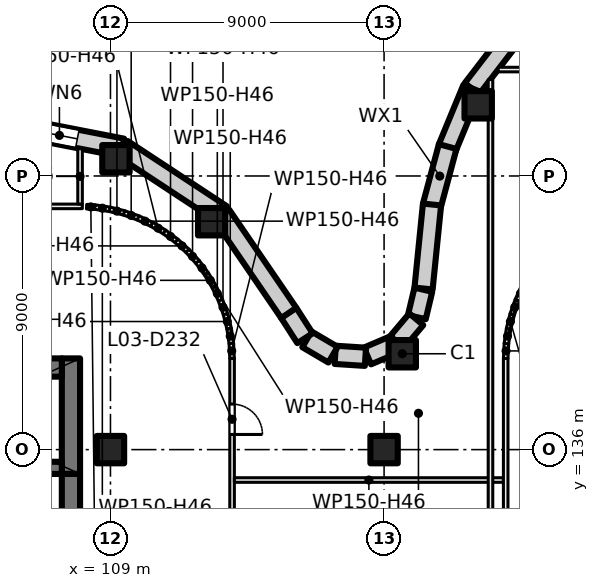
"""IFC4 building model, lengths in metres.
Left out: names, types, materials, properties, quantities, classifications, styles, units other than length and angle.
Written with IfcOpenShell. Run it as: python <this file> out.ifc"""

import sys

from ifc_helpers import new_model, si_unit, direction, frame, frame_2d, origin, origin_2d, place, context, subcontext, project, spatial, rectangle, extrude, element, fill, save


model = new_model("IFC4")
c1 = context("Model", 3, precision=1e-05, world=origin(), true_north=direction((0.0, 1.0)))
c2 = subcontext(c1, "Body", "Model", "MODEL_VIEW")
j1 = project(units=[si_unit("LENGTHUNIT", "METRE"), si_unit("PLANEANGLEUNIT", "RADIAN")], contexts=[c1])
p1 = place(None, origin())
s1 = spatial("IfcSite", under=j1, at=p1, CompositionType="ELEMENT")
p2 = place(p1, origin())
s2 = spatial("IfcBuilding", under=s1, at=p2, CompositionType="ELEMENT")
p3 = place(p2, frame((0.0, 0.0, 17.5)))
s3 = spatial("IfcBuildingStorey", under=s2, at=p3, CompositionType="ELEMENT", Elevation=17.5)
for number, where, z_axis, x_axis in (
    (1, (109.0, 136.0, 0.0), (0.0, 0.0, 1.0), (1.0, 0.0, 0.0)),
    (2, (118.0, 136.0, 0.0), (0.0, 0.0, 1.0), (1.0, 0.0, 0.0)),
    (3, (109.18, 145.567, 0.0), (0.0, 0.0, 1.0), (1.0, 0.0, 0.0)),
    (4, (112.329, 143.496, 0.0), (0.0, 0.0, 1.0), (1.0, 0.0, 0.0)),
    (5, (118.598, 139.153, 0.0), (0.0, 0.0, 1.0), (1.0, 0.0, 0.0)),
    (6, (121.095, 147.341, 0.0), (0.0, 0.0, 1.0), (1.0, 0.0, 0.0)),
):
    element("IfcColumn", number, at=place(p3, frame(where, z_axis=z_axis, x_axis=x_axis)), inside=s3, PredefinedType="COLUMN", context=c2, shape_type="SweptSolid", body=[
        extrude(rectangle(XDim=0.9, YDim=0.9, at=origin_2d()), origin(), (0.0, 0.0, 1.0), 5.0),
    ])
p4 = place(p3, frame((107.7, 139.0, 0.0), z_axis=(0.0, 0.0, 1.0), x_axis=(0.0, -1.0, 0.0)))
e7 = element("IfcWall", 7, at=p4, inside=s3, PredefinedType="SHEAR", context=c2, shape_type="SweptSolid", body=[
    extrude(rectangle(XDim=3.8, YDim=0.6, at=frame_2d((1.9, 0.0))), origin(), (0.0, 0.0, 1.0), 5.0),
])
p5 = place(p3, frame((107.7, 135.2, 0.0), z_axis=(0.0, 0.0, 1.0), x_axis=(0.0, -1.0, 0.0)))
e8 = element("IfcWall", 8, at=p5, inside=s3, PredefinedType="SHEAR", context=c2, shape_type="SweptSolid", body=[
    extrude(rectangle(XDim=14.4, YDim=0.6, at=frame_2d((7.2, 0.0))), origin(), (0.0, 0.0, 1.0), 5.0),
])
p6 = place(p3, frame((107.4, 138.7, 0.0), z_axis=(0.0, 0.0, 1.0), x_axis=(-1.0, 0.0, 0.0)))
e9 = element("IfcWall", 9, at=p6, inside=s3, PredefinedType="SHEAR", context=c2, shape_type="SweptSolid", body=[
    extrude(rectangle(XDim=7.8, YDim=0.6, at=frame_2d((3.9, 0.0))), origin(), (0.0, 0.0, 1.0), 5.0),
])
p7 = place(p3, frame((107.4, 135.4, 0.0), z_axis=(0.0, 0.0, 1.0), x_axis=(-1.0, 0.0, 0.0)))
e10 = element("IfcWall", 10, at=p7, inside=s3, PredefinedType="SHEAR", context=c2, shape_type="SweptSolid", body=[
    extrude(rectangle(XDim=7.8, YDim=0.4, at=frame_2d((3.9, 0.0))), origin(), (0.0, 0.0, 1.0), 5.0),
])
p8 = place(p3, frame((120.891, 147.872, 0.0), z_axis=(0.0, 0.0, 1.0), x_axis=(0.609058260448, 0.793125485267, 0.0)))
e11 = element("IfcWall", 11, at=p8, inside=s3, PredefinedType="SOLIDWALL", context=c2, shape_type="SweptSolid", body=[
    extrude(rectangle(XDim=2.044, YDim=0.6, at=frame_2d((1.022, 0.0))), origin(), (0.0, 0.0, 1.0), 4.6),
])
p9 = place(p3, frame((120.079, 145.931, 0.0), z_axis=(0.0, 0.0, 1.0), x_axis=(0.382375593358, 0.924006983526, 0.0)))
e12 = element("IfcWall", 12, at=p9, inside=s3, PredefinedType="SOLIDWALL", context=c2, shape_type="SweptSolid", body=[
    extrude(rectangle(XDim=2.114, YDim=0.6, at=frame_2d((1.057, 0.0))), origin(), (0.0, 0.0, 1.0), 4.6),
])
p10 = place(p3, frame((119.571, 144.024, 0.0), z_axis=(0.0, 0.0, 1.0), x_axis=(0.25888565912, 0.965907974655, 0.0)))
e13 = element("IfcWall", 13, at=p10, inside=s3, PredefinedType="SOLIDWALL", context=c2, shape_type="SweptSolid", body=[
    extrude(rectangle(XDim=2.012, YDim=0.6, at=frame_2d((1.006, 0.0))), origin(), (0.0, 0.0, 1.0), 4.6),
])
p11 = place(p3, frame((119.299, 141.298, 0.0), z_axis=(0.0, 0.0, 1.0), x_axis=(0.100121632527, 0.994975205068, 0.0)))
e14 = element("IfcWall", 14, at=p11, inside=s3, PredefinedType="SOLIDWALL", context=c2, shape_type="SweptSolid", body=[
    extrude(rectangle(XDim=2.777, YDim=0.6, at=frame_2d((1.389, 0.0))), origin(), (0.0, 0.0, 1.0), 4.6),
])
p12 = place(p3, frame((119.077, 140.358, 0.0), z_axis=(0.0, 0.0, 1.0), x_axis=(0.231477954295, 0.972840149601, 0.0)))
e15 = element("IfcWall", 15, at=p12, inside=s3, PredefinedType="SOLIDWALL", context=c2, shape_type="SweptSolid", body=[
    extrude(rectangle(XDim=0.926, YDim=0.6, at=frame_2d((0.463, 0.0))), origin(), (0.0, 0.0, 1.0), 4.6),
])
for number, where, z_axis, x_axis in (
    (16, (118.417, 139.526, 0.0), (0.0, 0.0, 1.0), (0.645, 0.764, 0.0)),
    (17, (117.454, 139.081, 0.0), (0.0, 0.0, 1.0), (0.92, 0.392, 0.0)),
    (18, (116.393, 139.117, 0.0), (0.0, 0.0, 1.0), (0.998, -0.064, 0.0)),
    (19, (115.461, 139.627, 0.0), (0.0, 0.0, 1.0), (0.862, -0.507, 0.0)),
):
    element("IfcWall", number, at=place(p3, frame(where, z_axis=z_axis, x_axis=x_axis)), inside=s3, PredefinedType="SOLIDWALL", context=c2, shape_type="SweptSolid", body=[
        extrude(rectangle(XDim=0.996, YDim=0.6, at=frame_2d((0.498, 0.0))), origin(), (0.0, 0.0, 1.0), 4.6),
    ])
p13 = place(p3, frame((114.86, 140.502, 0.0), z_axis=(0.0, 0.0, 1.0), x_axis=(0.541339592117, -0.84080404733, 0.0)))
e20 = element("IfcWall", 20, at=p13, inside=s3, PredefinedType="SOLIDWALL", context=c2, shape_type="SweptSolid", body=[
    extrude(rectangle(XDim=0.996, YDim=0.6, at=frame_2d((0.498, 0.0))), origin(), (0.0, 0.0, 1.0), 4.6),
])
p14 = place(p3, frame((112.661, 143.72, 0.0), z_axis=(0.0, 0.0, 1.0), x_axis=(0.564314082571, -0.825560183277, 0.0)))
e21 = element("IfcWall", 21, at=p14, inside=s3, PredefinedType="SOLIDWALL", context=c2, shape_type="SweptSolid", body=[
    extrude(rectangle(XDim=3.905, YDim=0.6, at=frame_2d((1.953, 0.0))), origin(), (0.0, 0.0, 1.0), 4.6),
])
p15 = place(p3, frame((109.401, 145.9, 0.0), z_axis=(0.0, 0.0, 1.0), x_axis=(0.835543958523, -0.549423601037, 0.0)))
e22 = element("IfcWall", 22, at=p15, inside=s3, PredefinedType="SOLIDWALL", context=c2, shape_type="SweptSolid", body=[
    extrude(rectangle(XDim=3.906, YDim=0.6, at=frame_2d((1.953, 0.0))), origin(), (0.0, 0.0, 1.0), 4.6),
])
p16 = place(p3, frame((105.44, 146.702, 0.0), z_axis=(0.0, 0.0, 1.0), x_axis=(0.981593603981, -0.190981665674, 0.0)))
e23 = element("IfcWall", 23, at=p16, inside=s3, PredefinedType="SOLIDWALL", context=c2, shape_type="SweptSolid", body=[
    extrude(rectangle(XDim=4.025, YDim=0.6, at=frame_2d((2.013, 0.0))), origin(), (0.0, 0.0, 1.0), 4.6),
])
p17 = place(p16, frame((1.316, 0.0, 0.9)))
e24 = element("IfcOpeningElement", 24, at=p17, cuts=e23, PredefinedType="OPENING", context=c2, shape_type="SweptSolid", body=[
    extrude(rectangle(XDim=1.2, YDim=3.0, at=frame_2d((0.6, 1.5))), frame((0.0, 0.31, 0.0), z_axis=(0.0, -1.0, 0.0), x_axis=(1.0, 0.0, 0.0)), (0.0, 0.0, 1.0), 0.62),
])
p18 = place(p3, frame((90.998, 144.0, 0.0), z_axis=(0.0, 0.0, 1.0), x_axis=(1.0, 0.0, 0.0)))
e25 = element("IfcWall", 25, at=p18, inside=s3, PredefinedType="PARTITIONING", context=c2, shape_type="SweptSolid", body=[
    extrude(rectangle(XDim=17.077, YDim=0.15, at=frame_2d((8.539, 0.0))), origin(), (0.0, 0.0, 1.0), 4.6),
])
p19 = place(p18, frame((1.254, 0.0, 0.0)))
e26 = element("IfcOpeningElement", 26, at=p19, cuts=e25, PredefinedType="OPENING", context=c2, shape_type="SweptSolid", body=[
    extrude(rectangle(XDim=1.0, YDim=2.1, at=frame_2d((0.5, 1.05))), frame((0.0, 0.085, 0.0), z_axis=(0.0, -1.0, 0.0), x_axis=(1.0, 0.0, 0.0)), (0.0, 0.0, 1.0), 0.17),
])
p20 = place(p18, frame((9.75, 0.0, 0.0)))
e27 = element("IfcOpeningElement", 27, at=p20, cuts=e25, PredefinedType="OPENING", context=c2, shape_type="SweptSolid", body=[
    extrude(rectangle(XDim=1.0, YDim=2.1, at=frame_2d((0.5, 1.05))), frame((0.0, 0.085, 0.0), z_axis=(0.0, -1.0, 0.0), x_axis=(1.0, 0.0, 0.0)), (0.0, 0.0, 1.0), 0.17),
])
p21 = place(p3, frame((108.0, 144.075, 0.0), z_axis=(0.0, 0.0, 1.0), x_axis=(0.0, 1.0, 0.0)))
e28 = element("IfcWall", 28, at=p21, inside=s3, PredefinedType="PARTITIONING", context=c2, shape_type="SweptSolid", body=[
    extrude(rectangle(XDim=1.823, YDim=0.15, at=frame_2d((0.912, 0.0))), origin(), (0.0, 0.0, 1.0), 4.6),
])
p22 = place(p3, frame((108.214, 143.99, 0.0), z_axis=(0.0, 0.0, 1.0), x_axis=(0.99876534507, -0.049676810357, 0.0)))
e29 = element("IfcWall", 29, at=p22, inside=s3, PredefinedType="PARTITIONING", context=c2, shape_type="SweptSolid", body=[
    extrude(rectangle(XDim=0.28, YDim=0.15, at=frame_2d((0.14, 0.0))), origin(), (0.0, 0.0, 1.0), 4.6),
])
p23 = place(p3, frame((108.486, 143.977, 0.0), z_axis=(0.0, 0.0, 1.0), x_axis=(0.988925572052, -0.148412307247, 0.0)))
e30 = element("IfcWall", 30, at=p23, inside=s3, PredefinedType="PARTITIONING", context=c2, shape_type="SweptSolid", body=[
    extrude(rectangle(XDim=0.499, YDim=0.15, at=frame_2d((0.249, 0.0))), origin(), (0.0, 0.0, 1.0), 4.6),
])
p24 = place(p3, frame((108.971, 143.905, 0.0), z_axis=(0.0, 0.0, 1.0), x_axis=(0.970113715952, -0.242650732785, 0.0)))
e31 = element("IfcWall", 31, at=p24, inside=s3, PredefinedType="PARTITIONING", context=c2, shape_type="SweptSolid", body=[
    extrude(rectangle(XDim=0.499, YDim=0.15, at=frame_2d((0.25, 0.0))), origin(), (0.0, 0.0, 1.0), 4.6),
])
for number, where, z_axis, x_axis in (
    (32, (109.447, 143.786, 0.0), (0.0, 0.0, 1.0), (0.941, -0.337, 0.0)),
    (33, (109.91, 143.621, 0.0), (0.0, 0.0, 1.0), (0.904, -0.428, 0.0)),
):
    element("IfcWall", number, at=place(p3, frame(where, z_axis=z_axis, x_axis=x_axis)), inside=s3, PredefinedType="PARTITIONING", context=c2, shape_type="SweptSolid", body=[
        extrude(rectangle(XDim=0.498, YDim=0.15, at=frame_2d((0.249, 0.0))), origin(), (0.0, 0.0, 1.0), 4.6),
    ])
p25 = place(p3, frame((110.354, 143.412, 0.0), z_axis=(0.0, 0.0, 1.0), x_axis=(0.85671397893, -0.515791778052, 0.0)))
e34 = element("IfcWall", 34, at=p25, inside=s3, PredefinedType="PARTITIONING", context=c2, shape_type="SweptSolid", body=[
    extrude(rectangle(XDim=0.499, YDim=0.15, at=frame_2d((0.249, 0.0))), origin(), (0.0, 0.0, 1.0), 4.6),
])
p26 = place(p3, frame((110.775, 143.159, 0.0), z_axis=(0.0, 0.0, 1.0), x_axis=(0.80404358372, -0.594570362092, 0.0)))
e35 = element("IfcWall", 35, at=p26, inside=s3, PredefinedType="PARTITIONING", context=c2, shape_type="SweptSolid", body=[
    extrude(rectangle(XDim=0.498, YDim=0.15, at=frame_2d((0.249, 0.0))), origin(), (0.0, 0.0, 1.0), 4.6),
])
for number, where, z_axis, x_axis in (
    (36, (111.169, 142.867, 0.0), (0.0, 0.0, 1.0), (0.742, -0.67, 0.0)),
    (37, (111.533, 142.539, 0.0), (0.0, 0.0, 1.0), (0.67, -0.742, 0.0)),
):
    element("IfcWall", number, at=place(p3, frame(where, z_axis=z_axis, x_axis=x_axis)), inside=s3, PredefinedType="PARTITIONING", context=c2, shape_type="SweptSolid", body=[
        extrude(rectangle(XDim=0.499, YDim=0.15, at=frame_2d((0.249, 0.0))), origin(), (0.0, 0.0, 1.0), 4.6),
    ])
p27 = place(p3, frame((111.863, 142.175, 0.0), z_axis=(0.0, 0.0, 1.0), x_axis=(0.594570362092, -0.80404358372, 0.0)))
e38 = element("IfcWall", 38, at=p27, inside=s3, PredefinedType="PARTITIONING", context=c2, shape_type="SweptSolid", body=[
    extrude(rectangle(XDim=0.498, YDim=0.15, at=frame_2d((0.249, 0.0))), origin(), (0.0, 0.0, 1.0), 4.6),
])
p28 = place(p3, frame((112.155, 141.781, 0.0), z_axis=(0.0, 0.0, 1.0), x_axis=(0.515791778052, -0.85671397893, 0.0)))
e39 = element("IfcWall", 39, at=p28, inside=s3, PredefinedType="PARTITIONING", context=c2, shape_type="SweptSolid", body=[
    extrude(rectangle(XDim=0.499, YDim=0.15, at=frame_2d((0.249, 0.0))), origin(), (0.0, 0.0, 1.0), 4.6),
])
for number, where, z_axis, x_axis in (
    (40, (112.408, 141.36, 0.0), (0.0, 0.0, 1.0), (0.428, -0.904, 0.0)),
    (41, (112.618, 140.916, 0.0), (0.0, 0.0, 1.0), (0.337, -0.941, 0.0)),
):
    element("IfcWall", number, at=place(p3, frame(where, z_axis=z_axis, x_axis=x_axis)), inside=s3, PredefinedType="PARTITIONING", context=c2, shape_type="SweptSolid", body=[
        extrude(rectangle(XDim=0.498, YDim=0.15, at=frame_2d((0.249, 0.0))), origin(), (0.0, 0.0, 1.0), 4.6),
    ])
p29 = place(p3, frame((112.784, 140.455, 0.0), z_axis=(0.0, 0.0, 1.0), x_axis=(0.242650732785, -0.970113715952, 0.0)))
e42 = element("IfcWall", 42, at=p29, inside=s3, PredefinedType="PARTITIONING", context=c2, shape_type="SweptSolid", body=[
    extrude(rectangle(XDim=0.499, YDim=0.15, at=frame_2d((0.25, 0.0))), origin(), (0.0, 0.0, 1.0), 4.6),
])
p30 = place(p3, frame((112.903, 139.979, 0.0), z_axis=(0.0, 0.0, 1.0), x_axis=(0.148412307247, -0.988925572052, 0.0)))
e43 = element("IfcWall", 43, at=p30, inside=s3, PredefinedType="PARTITIONING", context=c2, shape_type="SweptSolid", body=[
    extrude(rectangle(XDim=0.499, YDim=0.15, at=frame_2d((0.249, 0.0))), origin(), (0.0, 0.0, 1.0), 4.6),
])
p31 = place(p3, frame((112.976, 139.494, 0.0), z_axis=(0.0, 0.0, 1.0), x_axis=(0.048196018647, -0.998837896651, 0.0)))
e44 = element("IfcWall", 44, at=p31, inside=s3, PredefinedType="PARTITIONING", context=c2, shape_type="SweptSolid", body=[
    extrude(rectangle(XDim=0.496, YDim=0.15, at=frame_2d((0.248, 0.0))), origin(), (0.0, 0.0, 1.0), 4.6),
])
p32 = place(p3, frame((113.0, 139.002, 0.0), z_axis=(0.0, 0.0, 1.0), x_axis=(0.0, -1.0, 0.0)))
e45 = element("IfcWall", 45, at=p32, inside=s3, PredefinedType="PARTITIONING", context=c2, shape_type="SweptSolid", body=[
    extrude(rectangle(XDim=22.004, YDim=0.15, at=frame_2d((11.002, 0.0))), origin(), (0.0, 0.0, 1.0), 4.6),
])
p33 = place(p32, frame((19.25, 0.0, 0.0)))
e46 = element("IfcOpeningElement", 46, at=p33, cuts=e45, PredefinedType="OPENING", context=c2, shape_type="SweptSolid", body=[
    extrude(rectangle(XDim=1.0, YDim=2.1, at=frame_2d((0.5, 1.05))), frame((0.0, 0.085, 0.0), z_axis=(0.0, -1.0, 0.0), x_axis=(1.0, 0.0, 0.0)), (0.0, 0.0, 1.0), 0.17),
])
p34 = place(p32, frame((10.252, 0.0, 0.0)))
e47 = element("IfcOpeningElement", 47, at=p34, cuts=e45, PredefinedType="OPENING", context=c2, shape_type="SweptSolid", body=[
    extrude(rectangle(XDim=1.0, YDim=2.1, at=frame_2d((0.5, 1.05))), frame((0.0, 0.085, 0.0), z_axis=(0.0, -1.0, 0.0), x_axis=(1.0, 0.0, 0.0)), (0.0, 0.0, 1.0), 0.17),
])
p35 = place(p32, frame((1.504, 0.0, 0.0)))
e48 = element("IfcOpeningElement", 48, at=p35, cuts=e45, PredefinedType="OPENING", context=c2, shape_type="SweptSolid", body=[
    extrude(rectangle(XDim=1.0, YDim=2.1, at=frame_2d((0.5, 1.05))), frame((0.0, 0.085, 0.0), z_axis=(0.0, -1.0, 0.0), x_axis=(1.0, 0.0, 0.0)), (0.0, 0.0, 1.0), 0.17),
])
p36 = place(p3, frame((113.075, 135.0, 0.0), z_axis=(0.0, 0.0, 1.0), x_axis=(1.0, 0.0, 0.0)))
e49 = element("IfcWall", 49, at=p36, inside=s3, PredefinedType="PARTITIONING", context=c2, shape_type="SweptSolid", body=[
    extrude(rectangle(XDim=8.85, YDim=0.15, at=frame_2d((4.425, 0.0))), origin(), (0.0, 0.0, 1.0), 4.6),
])
p37 = place(p3, frame((121.5, 107.925, 0.0), z_axis=(0.0, 0.0, 1.0), x_axis=(0.0, 1.0, 0.0)))
e50 = element("IfcWall", 50, at=p37, inside=s3, PredefinedType="PARTITIONING", context=c2, shape_type="SweptSolid", body=[
    extrude(rectangle(XDim=40.247, YDim=0.15, at=frame_2d((20.124, 0.0))), origin(), (0.0, 0.0, 1.0), 4.6),
])
p38 = place(p3, frame((121.752, 148.5, 0.0), z_axis=(0.0, 0.0, 1.0), x_axis=(1.0, 0.0, 0.0)))
e51 = element("IfcWall", 51, at=p38, inside=s3, PredefinedType="PARTITIONING", context=c2, shape_type="SweptSolid", body=[
    extrude(rectangle(XDim=13.323, YDim=0.15, at=frame_2d((6.662, 0.0))), origin(), (0.0, 0.0, 1.0), 4.6),
])
p39 = place(p3, frame((122.0, 139.002, 0.0), z_axis=(0.0, 0.0, 1.0), x_axis=(0.0, -1.0, 0.0)))
e52 = element("IfcWall", 52, at=p39, inside=s3, PredefinedType="PARTITIONING", context=c2, shape_type="SweptSolid", body=[
    extrude(rectangle(XDim=22.004, YDim=0.15, at=frame_2d((11.002, 0.0))), origin(), (0.0, 0.0, 1.0), 4.6),
])
p40 = place(p39, frame((10.252, 0.0, 0.0)))
e53 = element("IfcOpeningElement", 53, at=p40, cuts=e52, PredefinedType="OPENING", context=c2, shape_type="SweptSolid", body=[
    extrude(rectangle(XDim=1.0, YDim=2.1, at=frame_2d((0.5, 1.05))), frame((0.0, 0.085, 0.0), z_axis=(0.0, -1.0, 0.0), x_axis=(1.0, 0.0, 0.0)), (0.0, 0.0, 1.0), 0.17),
])
p41 = place(p3, frame((122.0, 138.998, 0.0), z_axis=(0.0, 0.0, 1.0), x_axis=(0.048196018647, 0.998837896651, 0.0)))
e54 = element("IfcWall", 54, at=p41, inside=s3, PredefinedType="PARTITIONING", context=c2, shape_type="SweptSolid", body=[
    extrude(rectangle(XDim=0.496, YDim=0.15, at=frame_2d((0.248, 0.0))), origin(), (0.0, 0.0, 1.0), 4.6),
])
p42 = place(p3, frame((122.023, 139.486, 0.0), z_axis=(0.0, 0.0, 1.0), x_axis=(0.148412307247, 0.988925572052, 0.0)))
e55 = element("IfcWall", 55, at=p42, inside=s3, PredefinedType="PARTITIONING", context=c2, shape_type="SweptSolid", body=[
    extrude(rectangle(XDim=0.499, YDim=0.15, at=frame_2d((0.249, 0.0))), origin(), (0.0, 0.0, 1.0), 4.6),
])
p43 = place(p3, frame((122.095, 139.971, 0.0), z_axis=(0.0, 0.0, 1.0), x_axis=(0.242650732785, 0.970113715952, 0.0)))
e56 = element("IfcWall", 56, at=p43, inside=s3, PredefinedType="PARTITIONING", context=c2, shape_type="SweptSolid", body=[
    extrude(rectangle(XDim=0.499, YDim=0.15, at=frame_2d((0.25, 0.0))), origin(), (0.0, 0.0, 1.0), 4.6),
])
for number, where, z_axis, x_axis in (
    (57, (122.214, 140.447, 0.0), (0.0, 0.0, 1.0), (0.337, 0.941, 0.0)),
    (58, (122.379, 140.91, 0.0), (0.0, 0.0, 1.0), (0.428, 0.904, 0.0)),
):
    element("IfcWall", number, at=place(p3, frame(where, z_axis=z_axis, x_axis=x_axis)), inside=s3, PredefinedType="PARTITIONING", context=c2, shape_type="SweptSolid", body=[
        extrude(rectangle(XDim=0.498, YDim=0.15, at=frame_2d((0.249, 0.0))), origin(), (0.0, 0.0, 1.0), 4.6),
    ])
p44 = place(p17, origin())
e59 = element("IfcWindow", 59, at=p44, inside=s3, PartitioningType="SINGLE_PANEL", PredefinedType="WINDOW", context=c2, shape_type="SweptSolid", body=[
    extrude(rectangle(XDim=1.2, YDim=3.0, at=frame_2d((0.6, 1.5))), frame((0.0, 0.03, 0.0), z_axis=(0.0, -1.0, 0.0), x_axis=(1.0, 0.0, 0.0)), (0.0, 0.0, 1.0), 0.06),
])
fill(e24, e59)
p45 = place(p35, origin())
e60 = element("IfcDoor", 60, at=p45, inside=s3, OperationType="SINGLE_SWING_RIGHT", PredefinedType="DOOR", context=c2, shape_type="SweptSolid", body=[
    extrude(rectangle(XDim=1.0, YDim=2.1, at=frame_2d((0.5, 1.05))), frame((0.0, 0.025, 0.0), z_axis=(0.0, -1.0, 0.0), x_axis=(1.0, 0.0, 0.0)), (0.0, 0.0, 1.0), 0.05),
])
fill(e48, e60)
save(model, sys.argv[1])
